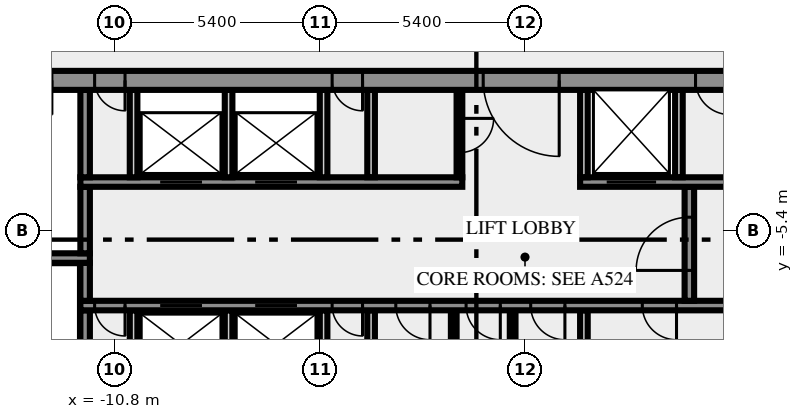
"""IFC4 building model, lengths in metres.
Left out: names, types, materials, properties, quantities, classifications, styles, units other than length and angle.
Written with IfcOpenShell. Run it as: python <this file> out.ifc"""

import sys

from ifc_helpers import new_model, si_unit, direction, frame, frame_2d, origin, place, context, subcontext, project, spatial, rectangle, extrude, element, fill, save


model = new_model("IFC4")
c1 = context("Model", 3, precision=1e-05, world=origin(), true_north=direction((0.0, 1.0)))
c2 = subcontext(c1, "Body", "Model", "MODEL_VIEW")
j1 = project(units=[si_unit("LENGTHUNIT", "METRE"), si_unit("PLANEANGLEUNIT", "RADIAN")], contexts=[c1])
p1 = place(None, origin())
s1 = spatial("IfcSite", under=j1, at=p1, CompositionType="ELEMENT")
p2 = place(p1, origin())
s2 = spatial("IfcBuilding", under=s1, at=p2, CompositionType="ELEMENT")
p3 = place(p2, frame((0.0, 0.0, 335.0)))
s3 = spatial("IfcBuildingStorey", under=s2, at=p3, CompositionType="ELEMENT", Elevation=335.0)
p4 = place(p3, frame((-11.575, -10.5, 0.0), z_axis=(0.0, 0.0, 1.0), x_axis=(0.0, 1.0, 0.0)))
e1 = element("IfcWall", 1, at=p4, inside=s3, PredefinedType="SHEAR", context=c2, shape_type="SweptSolid", body=[
    extrude(rectangle(XDim=3.0, YDim=0.25, at=frame_2d((1.5, 0.0))), origin(), (0.0, 0.0, 1.0), 3.65),
])
for number, where, z_axis, x_axis in (
    (2, (-10.3, -10.5, 0.0), (0.0, 0.0, 1.0), (0.0, 1.0, 0.0)),
    (3, (-7.8, -10.5, 0.0), (0.0, 0.0, 1.0), (0.0, 1.0, 0.0)),
    (4, (-5.3, -10.5, 0.0), (0.0, 0.0, 1.0), (0.0, 1.0, 0.0)),
    (5, (-4.05, -10.5, 0.0), (0.0, 0.0, 1.0), (0.0, 1.0, 0.0)),
):
    element("IfcWall", number, at=place(p3, frame(where, z_axis=z_axis, x_axis=x_axis)), inside=s3, PredefinedType="SOLIDWALL", context=c2, shape_type="SweptSolid", body=[
        extrude(rectangle(XDim=3.0, YDim=0.2, at=frame_2d((1.5, 0.0))), origin(), (0.0, 0.0, 1.0), 3.65),
    ])
for number, where, z_axis, x_axis in (
    (6, (-1.875, -10.5, 0.0), (0.0, 0.0, 1.0), (0.0, 1.0, 0.0)),
    (7, (-0.325, -10.5, 0.0), (0.0, 0.0, 1.0), (0.0, 1.0, 0.0)),
):
    element("IfcWall", number, at=place(p3, frame(where, z_axis=z_axis, x_axis=x_axis)), inside=s3, PredefinedType="PARTITIONING", context=c2, shape_type="SweptSolid", body=[
        extrude(rectangle(XDim=3.0, YDim=0.15, at=frame_2d((1.5, 0.0))), origin(), (0.0, 0.0, 1.0), 3.65),
    ])
p5 = place(p3, frame((1.55, -10.5, 0.0), z_axis=(0.0, 0.0, 1.0), x_axis=(0.0, 1.0, 0.0)))
e8 = element("IfcWall", 8, at=p5, inside=s3, PredefinedType="SOLIDWALL", context=c2, shape_type="SweptSolid", body=[
    extrude(rectangle(XDim=3.0, YDim=0.2, at=frame_2d((1.5, 0.0))), origin(), (0.0, 0.0, 1.0), 3.65),
])
p6 = place(p3, frame((11.7, -7.375, 0.0), z_axis=(0.0, 0.0, 1.0), x_axis=(-1.0, 0.0, 0.0)))
e9 = element("IfcWall", 9, at=p6, inside=s3, PredefinedType="SHEAR", context=c2, shape_type="SweptSolid", body=[
    extrude(rectangle(XDim=23.4, YDim=0.25, at=frame_2d((11.7, 0.0))), origin(), (0.0, 0.0, 1.0), 3.65),
])
p7 = place(p6, frame((22.225, 0.0, 0.0)))
e10 = element("IfcOpeningElement", 10, at=p7, cuts=e9, PredefinedType="OPENING", context=c2, shape_type="SweptSolid", body=[
    extrude(rectangle(XDim=0.8, YDim=2.1, at=frame_2d((0.4, 1.05))), frame((0.0, 0.135, 0.0), z_axis=(0.0, -1.0, 0.0), x_axis=(1.0, 0.0, 0.0)), (0.0, 0.0, 1.0), 0.27),
])
p8 = place(p6, frame((20.2, 0.0, 0.0)))
e11 = element("IfcOpeningElement", 11, at=p8, cuts=e9, PredefinedType="OPENING", context=c2, shape_type="SweptSolid", body=[
    extrude(rectangle(XDim=1.1, YDim=2.1, at=frame_2d((0.55, 1.05))), frame((0.0, 0.135, 0.0), z_axis=(0.0, -1.0, 0.0), x_axis=(1.0, 0.0, 0.0)), (0.0, 0.0, 1.0), 0.27),
])
p9 = place(p6, frame((17.7, 0.0, 0.0)))
e12 = element("IfcOpeningElement", 12, at=p9, cuts=e9, PredefinedType="OPENING", context=c2, shape_type="SweptSolid", body=[
    extrude(rectangle(XDim=1.1, YDim=2.1, at=frame_2d((0.55, 1.05))), frame((0.0, 0.135, 0.0), z_axis=(0.0, -1.0, 0.0), x_axis=(1.0, 0.0, 0.0)), (0.0, 0.0, 1.0), 0.27),
])
p10 = place(p6, frame((15.975, 0.0, 0.0)))
e13 = element("IfcOpeningElement", 13, at=p10, cuts=e9, PredefinedType="OPENING", context=c2, shape_type="SweptSolid", body=[
    extrude(rectangle(XDim=0.8, YDim=2.1, at=frame_2d((0.4, 1.05))), frame((0.0, 0.135, 0.0), z_axis=(0.0, -1.0, 0.0), x_axis=(1.0, 0.0, 0.0)), (0.0, 0.0, 1.0), 0.27),
])
p11 = place(p6, frame((14.2, 0.0, 0.0)))
e14 = element("IfcOpeningElement", 14, at=p11, cuts=e9, PredefinedType="OPENING", context=c2, shape_type="SweptSolid", body=[
    extrude(rectangle(XDim=0.9, YDim=2.1, at=frame_2d((0.45, 1.05))), frame((0.0, 0.135, 0.0), z_axis=(0.0, -1.0, 0.0), x_axis=(1.0, 0.0, 0.0)), (0.0, 0.0, 1.0), 0.27),
])
p12 = place(p6, frame((12.35, 0.0, 0.0)))
e15 = element("IfcOpeningElement", 15, at=p12, cuts=e9, PredefinedType="OPENING", context=c2, shape_type="SweptSolid", body=[
    extrude(rectangle(XDim=0.9, YDim=2.1, at=frame_2d((0.45, 1.05))), frame((0.0, 0.135, 0.0), z_axis=(0.0, -1.0, 0.0), x_axis=(1.0, 0.0, 0.0)), (0.0, 0.0, 1.0), 0.27),
])
p13 = place(p6, frame((10.65, 0.0, 0.0)))
e16 = element("IfcOpeningElement", 16, at=p13, cuts=e9, PredefinedType="OPENING", context=c2, shape_type="SweptSolid", body=[
    extrude(rectangle(XDim=0.9, YDim=2.1, at=frame_2d((0.45, 1.05))), frame((0.0, 0.135, 0.0), z_axis=(0.0, -1.0, 0.0), x_axis=(1.0, 0.0, 0.0)), (0.0, 0.0, 1.0), 0.27),
])
p14 = place(p6, frame((7.713, 0.0, 0.0)))
e17 = element("IfcOpeningElement", 17, at=p14, cuts=e9, PredefinedType="OPENING", context=c2, shape_type="SweptSolid", body=[
    extrude(rectangle(XDim=0.9, YDim=2.1, at=frame_2d((0.45, 1.05))), frame((0.0, 0.135, 0.0), z_axis=(0.0, -1.0, 0.0), x_axis=(1.0, 0.0, 0.0)), (0.0, 0.0, 1.0), 0.27),
])
p15 = place(p6, frame((4.15, 0.0, 0.0)))
e18 = element("IfcOpeningElement", 18, at=p15, cuts=e9, PredefinedType="OPENING", context=c2, shape_type="SweptSolid", body=[
    extrude(rectangle(XDim=0.9, YDim=2.1, at=frame_2d((0.45, 1.05))), frame((0.0, 0.135, 0.0), z_axis=(0.0, -1.0, 0.0), x_axis=(1.0, 0.0, 0.0)), (0.0, 0.0, 1.0), 0.27),
])
p16 = place(p6, frame((1.138, 0.0, 0.0)))
e19 = element("IfcOpeningElement", 19, at=p16, cuts=e9, PredefinedType="OPENING", context=c2, shape_type="SweptSolid", body=[
    extrude(rectangle(XDim=0.9, YDim=2.1, at=frame_2d((0.45, 1.05))), frame((0.0, 0.135, 0.0), z_axis=(0.0, -1.0, 0.0), x_axis=(1.0, 0.0, 0.0)), (0.0, 0.0, 1.0), 0.27),
])
p17 = place(p3, frame((-11.575, -7.25, 0.0), z_axis=(0.0, 0.0, 1.0), x_axis=(0.0, 1.0, 0.0)))
e20 = element("IfcWall", 20, at=p17, inside=s3, PredefinedType="SHEAR", context=c2, shape_type="SweptSolid", body=[
    extrude(rectangle(XDim=1.0, YDim=0.25, at=frame_2d((0.5, 0.0))), origin(), (0.0, 0.0, 1.0), 3.65),
])
p18 = place(p3, frame((4.325, -7.25, 0.0), z_axis=(0.0, 0.0, 1.0), x_axis=(0.0, 1.0, 0.0)))
e21 = element("IfcWall", 21, at=p18, inside=s3, PredefinedType="SHEAR", context=c2, shape_type="SweptSolid", body=[
    extrude(rectangle(XDim=3.0, YDim=0.25, at=frame_2d((1.5, 0.0))), origin(), (0.0, 0.0, 1.0), 3.65),
])
p19 = place(p18, frame((0.8, 0.0, 0.0)))
e22 = element("IfcOpeningElement", 22, at=p19, cuts=e21, PredefinedType="OPENING", context=c2, shape_type="SweptSolid", body=[
    extrude(rectangle(XDim=1.4, YDim=2.1, at=frame_2d((0.7, 1.05))), frame((0.0, 0.135, 0.0), z_axis=(0.0, -1.0, 0.0), x_axis=(1.0, 0.0, 0.0)), (0.0, 0.0, 1.0), 0.27),
])
p20 = place(p3, frame((-11.45, -6.125, 0.0), z_axis=(0.0, 0.0, 1.0), x_axis=(-1.0, 0.0, 0.0)))
e23 = element("IfcWall", 23, at=p20, inside=s3, PredefinedType="SHEAR", context=c2, shape_type="SweptSolid", body=[
    extrude(rectangle(XDim=8.05, YDim=0.25, at=frame_2d((4.025, 0.0))), origin(), (0.0, 0.0, 1.0), 3.65),
])
p21 = place(p20, frame((6.2, 0.0, 0.0)))
e24 = element("IfcOpeningElement", 24, at=p21, cuts=e23, PredefinedType="OPENING", context=c2, shape_type="SweptSolid", body=[
    extrude(rectangle(XDim=1.8, YDim=2.1, at=frame_2d((0.9, 1.05))), frame((0.0, 0.135, 0.0), z_axis=(0.0, -1.0, 0.0), x_axis=(1.0, 0.0, 0.0)), (0.0, 0.0, 1.0), 0.27),
])
p22 = place(p3, frame((-11.575, -6.0, 0.0), z_axis=(0.0, 0.0, 1.0), x_axis=(0.0, 1.0, 0.0)))
e25 = element("IfcWall", 25, at=p22, inside=s3, PredefinedType="SHEAR", context=c2, shape_type="SweptSolid", body=[
    extrude(rectangle(XDim=1.75, YDim=0.25, at=frame_2d((0.875, 0.0))), origin(), (0.0, 0.0, 1.0), 3.65),
])
p23 = place(p3, frame((-11.7, -4.125, 0.0), z_axis=(0.0, 0.0, 1.0), x_axis=(1.0, 0.0, 0.0)))
e26 = element("IfcWall", 26, at=p23, inside=s3, PredefinedType="SHEAR", context=c2, shape_type="SweptSolid", body=[
    extrude(rectangle(XDim=10.05, YDim=0.25, at=frame_2d((5.025, 0.0))), origin(), (0.0, 0.0, 1.0), 3.65),
])
p24 = place(p23, frame((2.1, 0.0, 0.0)))
e27 = element("IfcOpeningElement", 27, at=p24, cuts=e26, PredefinedType="OPENING", context=c2, shape_type="SweptSolid", body=[
    extrude(rectangle(XDim=1.1, YDim=2.1, at=frame_2d((0.55, 1.05))), frame((0.0, 0.135, 0.0), z_axis=(0.0, -1.0, 0.0), x_axis=(1.0, 0.0, 0.0)), (0.0, 0.0, 1.0), 0.27),
])
p25 = place(p23, frame((4.6, 0.0, 0.0)))
e28 = element("IfcOpeningElement", 28, at=p25, cuts=e26, PredefinedType="OPENING", context=c2, shape_type="SweptSolid", body=[
    extrude(rectangle(XDim=1.1, YDim=2.1, at=frame_2d((0.55, 1.05))), frame((0.0, 0.135, 0.0), z_axis=(0.0, -1.0, 0.0), x_axis=(1.0, 0.0, 0.0)), (0.0, 0.0, 1.0), 0.27),
])
p26 = place(p3, frame((1.45, -4.125, 0.0), z_axis=(0.0, 0.0, 1.0), x_axis=(1.0, 0.0, 0.0)))
e29 = element("IfcWall", 29, at=p26, inside=s3, PredefinedType="SHEAR", context=c2, shape_type="SweptSolid", body=[
    extrude(rectangle(XDim=10.25, YDim=0.25, at=frame_2d((5.125, 0.0))), origin(), (0.0, 0.0, 1.0), 3.65),
])
p27 = place(p26, frame((0.7, 0.0, 0.0)))
e30 = element("IfcOpeningElement", 30, at=p27, cuts=e29, PredefinedType="OPENING", context=c2, shape_type="SweptSolid", body=[
    extrude(rectangle(XDim=1.3, YDim=2.1, at=frame_2d((0.65, 1.05))), frame((0.0, 0.135, 0.0), z_axis=(0.0, -1.0, 0.0), x_axis=(1.0, 0.0, 0.0)), (0.0, 0.0, 1.0), 0.27),
])
p28 = place(p3, frame((-11.575, -4.0, 0.0), z_axis=(0.0, 0.0, 1.0), x_axis=(0.0, 1.0, 0.0)))
e31 = element("IfcWall", 31, at=p28, inside=s3, PredefinedType="SHEAR", context=c2, shape_type="SweptSolid", body=[
    extrude(rectangle(XDim=2.3, YDim=0.25, at=frame_2d((1.15, 0.0))), origin(), (0.0, 0.0, 1.0), 3.65),
])
for number, where, z_axis, x_axis in (
    (32, (-10.3, -4.0, 0.0), (0.0, 0.0, 1.0), (0.0, 1.0, 0.0)),
    (33, (-7.8, -4.0, 0.0), (0.0, 0.0, 1.0), (0.0, 1.0, 0.0)),
    (34, (-5.3, -4.0, 0.0), (0.0, 0.0, 1.0), (0.0, 1.0, 0.0)),
    (35, (-4.05, -4.0, 0.0), (0.0, 0.0, 1.0), (0.0, 1.0, 0.0)),
):
    element("IfcWall", number, at=place(p3, frame(where, z_axis=z_axis, x_axis=x_axis)), inside=s3, PredefinedType="SOLIDWALL", context=c2, shape_type="SweptSolid", body=[
        extrude(rectangle(XDim=2.3, YDim=0.2, at=frame_2d((1.15, 0.0))), origin(), (0.0, 0.0, 1.0), 3.65),
    ])
p29 = place(p3, frame((-1.725, -1.7, 0.0), z_axis=(0.0, 0.0, 1.0), x_axis=(0.0, -1.0, 0.0)))
e36 = element("IfcWall", 36, at=p29, inside=s3, PredefinedType="PARTITIONING", context=c2, shape_type="SweptSolid", body=[
    extrude(rectangle(XDim=2.3, YDim=0.15, at=frame_2d((1.15, 0.0))), origin(), (0.0, 0.0, 1.0), 3.65),
])
p30 = place(p29, frame((0.75, 0.0, 0.0)))
e37 = element("IfcOpeningElement", 37, at=p30, cuts=e36, PredefinedType="OPENING", context=c2, shape_type="SweptSolid", body=[
    extrude(rectangle(XDim=0.9, YDim=2.1, at=frame_2d((0.45, 1.05))), frame((0.0, 0.085, 0.0), z_axis=(0.0, -1.0, 0.0), x_axis=(1.0, 0.0, 0.0)), (0.0, 0.0, 1.0), 0.17),
])
for number, where, z_axis, x_axis in (
    (38, (1.55, -4.0, 0.0), (0.0, 0.0, 1.0), (0.0, 1.0, 0.0)),
    (39, (4.05, -4.0, 0.0), (0.0, 0.0, 1.0), (0.0, 1.0, 0.0)),
):
    element("IfcWall", number, at=place(p3, frame(where, z_axis=z_axis, x_axis=x_axis)), inside=s3, PredefinedType="SOLIDWALL", context=c2, shape_type="SweptSolid", body=[
        extrude(rectangle(XDim=2.3, YDim=0.2, at=frame_2d((1.15, 0.0))), origin(), (0.0, 0.0, 1.0), 3.65),
    ])
p31 = place(p3, frame((20.49, -1.45, 0.0), z_axis=(0.0, 0.0, 1.0), x_axis=(-1.0, 0.0, 0.0)))
e40 = element("IfcWall", 40, at=p31, inside=s3, PredefinedType="SHEAR", context=c2, shape_type="SweptSolid", body=[
    extrude(rectangle(XDim=40.98, YDim=0.5, at=frame_2d((20.49, 0.0))), origin(), (0.0, 0.0, 1.0), 3.65),
])
p32 = place(p31, frame((38.14, 0.0, 0.0)))
e41 = element("IfcOpeningElement", 41, at=p32, cuts=e40, PredefinedType="OPENING", context=c2, shape_type="SweptSolid", body=[
    extrude(rectangle(XDim=1.8, YDim=2.1, at=frame_2d((0.9, 1.05))), frame((0.0, 0.26, 0.0), z_axis=(0.0, -1.0, 0.0), x_axis=(1.0, 0.0, 0.0)), (0.0, 0.0, 1.0), 0.52),
])
p33 = place(p31, frame((36.728, 0.0, 0.0)))
e42 = element("IfcOpeningElement", 42, at=p33, cuts=e40, PredefinedType="OPENING", context=c2, shape_type="SweptSolid", body=[
    extrude(rectangle(XDim=0.8, YDim=2.1, at=frame_2d((0.4, 1.05))), frame((0.0, 0.26, 0.0), z_axis=(0.0, -1.0, 0.0), x_axis=(1.0, 0.0, 0.0)), (0.0, 0.0, 1.0), 0.52),
])
p34 = place(p31, frame((35.153, 0.0, 0.0)))
e43 = element("IfcOpeningElement", 43, at=p34, cuts=e40, PredefinedType="OPENING", context=c2, shape_type="SweptSolid", body=[
    extrude(rectangle(XDim=0.8, YDim=2.1, at=frame_2d((0.4, 1.05))), frame((0.0, 0.26, 0.0), z_axis=(0.0, -1.0, 0.0), x_axis=(1.0, 0.0, 0.0)), (0.0, 0.0, 1.0), 0.52),
])
p35 = place(p31, frame((32.94, 0.0, 0.0)))
e44 = element("IfcOpeningElement", 44, at=p35, cuts=e40, PredefinedType="OPENING", context=c2, shape_type="SweptSolid", body=[
    extrude(rectangle(XDim=0.9, YDim=2.1, at=frame_2d((0.45, 1.05))), frame((0.0, 0.26, 0.0), z_axis=(0.0, -1.0, 0.0), x_axis=(1.0, 0.0, 0.0)), (0.0, 0.0, 1.0), 0.52),
])
p36 = place(p31, frame((31.015, 0.0, 0.0)))
e45 = element("IfcOpeningElement", 45, at=p36, cuts=e40, PredefinedType="OPENING", context=c2, shape_type="SweptSolid", body=[
    extrude(rectangle(XDim=0.8, YDim=2.1, at=frame_2d((0.4, 1.05))), frame((0.0, 0.26, 0.0), z_axis=(0.0, -1.0, 0.0), x_axis=(1.0, 0.0, 0.0)), (0.0, 0.0, 1.0), 0.52),
])
p37 = place(p31, frame((24.765, 0.0, 0.0)))
e46 = element("IfcOpeningElement", 46, at=p37, cuts=e40, PredefinedType="OPENING", context=c2, shape_type="SweptSolid", body=[
    extrude(rectangle(XDim=0.8, YDim=2.1, at=frame_2d((0.4, 1.05))), frame((0.0, 0.26, 0.0), z_axis=(0.0, -1.0, 0.0), x_axis=(1.0, 0.0, 0.0)), (0.0, 0.0, 1.0), 0.52),
])
p38 = place(p31, frame((19.59, 0.0, 0.0)))
e47 = element("IfcOpeningElement", 47, at=p38, cuts=e40, PredefinedType="OPENING", context=c2, shape_type="SweptSolid", body=[
    extrude(rectangle(XDim=2.0, YDim=2.1, at=frame_2d((1.0, 1.05))), frame((0.0, 0.26, 0.0), z_axis=(0.0, -1.0, 0.0), x_axis=(1.0, 0.0, 0.0)), (0.0, 0.0, 1.0), 0.52),
])
p39 = place(p31, frame((15.103, 0.0, 0.0)))
e48 = element("IfcOpeningElement", 48, at=p39, cuts=e40, PredefinedType="OPENING", context=c2, shape_type="SweptSolid", body=[
    extrude(rectangle(XDim=0.9, YDim=2.1, at=frame_2d((0.45, 1.05))), frame((0.0, 0.26, 0.0), z_axis=(0.0, -1.0, 0.0), x_axis=(1.0, 0.0, 0.0)), (0.0, 0.0, 1.0), 0.52),
])
p40 = place(p31, frame((13.04, 0.0, 0.0)))
e49 = element("IfcOpeningElement", 49, at=p40, cuts=e40, PredefinedType="OPENING", context=c2, shape_type="SweptSolid", body=[
    extrude(rectangle(XDim=0.9, YDim=2.1, at=frame_2d((0.45, 1.05))), frame((0.0, 0.26, 0.0), z_axis=(0.0, -1.0, 0.0), x_axis=(1.0, 0.0, 0.0)), (0.0, 0.0, 1.0), 0.52),
])
p41 = place(p31, frame((10.177, 0.0, 0.0)))
e50 = element("IfcOpeningElement", 50, at=p41, cuts=e40, PredefinedType="OPENING", context=c2, shape_type="SweptSolid", body=[
    extrude(rectangle(XDim=0.9, YDim=2.1, at=frame_2d((0.45, 1.05))), frame((0.0, 0.26, 0.0), z_axis=(0.0, -1.0, 0.0), x_axis=(1.0, 0.0, 0.0)), (0.0, 0.0, 1.0), 0.52),
])
p42 = place(p31, frame((7.14, 0.0, 0.0)))
e51 = element("IfcOpeningElement", 51, at=p42, cuts=e40, PredefinedType="OPENING", context=c2, shape_type="SweptSolid", body=[
    extrude(rectangle(XDim=0.9, YDim=2.1, at=frame_2d((0.45, 1.05))), frame((0.0, 0.26, 0.0), z_axis=(0.0, -1.0, 0.0), x_axis=(1.0, 0.0, 0.0)), (0.0, 0.0, 1.0), 0.52),
])
p43 = place(p31, frame((4.19, 0.0, 0.0)))
e52 = element("IfcOpeningElement", 52, at=p43, cuts=e40, PredefinedType="OPENING", context=c2, shape_type="SweptSolid", body=[
    extrude(rectangle(XDim=0.9, YDim=2.1, at=frame_2d((0.45, 1.05))), frame((0.0, 0.26, 0.0), z_axis=(0.0, -1.0, 0.0), x_axis=(1.0, 0.0, 0.0)), (0.0, 0.0, 1.0), 0.52),
])
p44 = place(p31, frame((1.04, 0.0, 0.0)))
e53 = element("IfcOpeningElement", 53, at=p44, cuts=e40, PredefinedType="OPENING", context=c2, shape_type="SweptSolid", body=[
    extrude(rectangle(XDim=1.8, YDim=2.1, at=frame_2d((0.9, 1.05))), frame((0.0, 0.26, 0.0), z_axis=(0.0, -1.0, 0.0), x_axis=(1.0, 0.0, 0.0)), (0.0, 0.0, 1.0), 0.52),
])
p45 = place(p7, origin())
e54 = element("IfcDoor", 54, at=p45, inside=s3, OperationType="SINGLE_SWING_RIGHT", PredefinedType="DOOR", context=c2, shape_type="SweptSolid", body=[
    extrude(rectangle(XDim=0.8, YDim=2.1, at=frame_2d((0.4, 1.05))), frame((0.0, 0.025, 0.0), z_axis=(0.0, -1.0, 0.0), x_axis=(1.0, 0.0, 0.0)), (0.0, 0.0, 1.0), 0.05),
])
fill(e10, e54)
p46 = place(p8, origin())
e55 = element("IfcDoor", 55, at=p46, inside=s3, OperationType="DOUBLE_DOOR_SLIDING", PredefinedType="DOOR", context=c2, shape_type="SweptSolid", body=[
    extrude(rectangle(XDim=1.1, YDim=2.1, at=frame_2d((0.55, 1.05))), frame((0.0, 0.025, 0.0), z_axis=(0.0, -1.0, 0.0), x_axis=(1.0, 0.0, 0.0)), (0.0, 0.0, 1.0), 0.05),
])
fill(e11, e55)
p47 = place(p9, origin())
e56 = element("IfcDoor", 56, at=p47, inside=s3, OperationType="DOUBLE_DOOR_SLIDING", PredefinedType="DOOR", context=c2, shape_type="SweptSolid", body=[
    extrude(rectangle(XDim=1.1, YDim=2.1, at=frame_2d((0.55, 1.05))), frame((0.0, 0.025, 0.0), z_axis=(0.0, -1.0, 0.0), x_axis=(1.0, 0.0, 0.0)), (0.0, 0.0, 1.0), 0.05),
])
fill(e12, e56)
p48 = place(p10, origin())
e57 = element("IfcDoor", 57, at=p48, inside=s3, OperationType="SINGLE_SWING_RIGHT", PredefinedType="DOOR", context=c2, shape_type="SweptSolid", body=[
    extrude(rectangle(XDim=0.8, YDim=2.1, at=frame_2d((0.4, 1.05))), frame((0.0, 0.025, 0.0), z_axis=(0.0, -1.0, 0.0), x_axis=(1.0, 0.0, 0.0)), (0.0, 0.0, 1.0), 0.05),
])
fill(e13, e57)
p49 = place(p11, origin())
e58 = element("IfcDoor", 58, at=p49, inside=s3, OperationType="SINGLE_SWING_RIGHT", PredefinedType="DOOR", context=c2, shape_type="SweptSolid", body=[
    extrude(rectangle(XDim=0.9, YDim=2.1, at=frame_2d((0.45, 1.05))), frame((0.0, 0.025, 0.0), z_axis=(0.0, -1.0, 0.0), x_axis=(1.0, 0.0, 0.0)), (0.0, 0.0, 1.0), 0.05),
])
fill(e14, e58)
p50 = place(p12, origin())
e59 = element("IfcDoor", 59, at=p50, inside=s3, OperationType="SINGLE_SWING_RIGHT", PredefinedType="DOOR", context=c2, shape_type="SweptSolid", body=[
    extrude(rectangle(XDim=0.9, YDim=2.1, at=frame_2d((0.45, 1.05))), frame((0.0, 0.025, 0.0), z_axis=(0.0, -1.0, 0.0), x_axis=(1.0, 0.0, 0.0)), (0.0, 0.0, 1.0), 0.05),
])
fill(e15, e59)
p51 = place(p13, origin())
e60 = element("IfcDoor", 60, at=p51, inside=s3, OperationType="SINGLE_SWING_LEFT", PredefinedType="DOOR", context=c2, shape_type="SweptSolid", body=[
    extrude(rectangle(XDim=0.9, YDim=2.1, at=frame_2d((0.45, 1.05))), frame((0.0, 0.025, 0.0), z_axis=(0.0, -1.0, 0.0), x_axis=(1.0, 0.0, 0.0)), (0.0, 0.0, 1.0), 0.05),
])
fill(e16, e60)
p52 = place(p14, origin())
e61 = element("IfcDoor", 61, at=p52, inside=s3, OperationType="SINGLE_SWING_LEFT", PredefinedType="DOOR", context=c2, shape_type="SweptSolid", body=[
    extrude(rectangle(XDim=0.9, YDim=2.1, at=frame_2d((0.45, 1.05))), frame((0.0, 0.025, 0.0), z_axis=(0.0, -1.0, 0.0), x_axis=(1.0, 0.0, 0.0)), (0.0, 0.0, 1.0), 0.05),
])
fill(e17, e61)
p53 = place(p19, origin())
e62 = element("IfcDoor", 62, at=p53, inside=s3, OperationType="DOUBLE_DOOR_SINGLE_SWING", PredefinedType="DOOR", context=c2, shape_type="SweptSolid", body=[
    extrude(rectangle(XDim=1.4, YDim=2.1, at=frame_2d((0.7, 1.05))), frame((0.0, 0.025, 0.0), z_axis=(0.0, -1.0, 0.0), x_axis=(1.0, 0.0, 0.0)), (0.0, 0.0, 1.0), 0.05),
])
fill(e22, e62)
p54 = place(p24, origin())
e63 = element("IfcDoor", 63, at=p54, inside=s3, OperationType="DOUBLE_DOOR_SLIDING", PredefinedType="DOOR", context=c2, shape_type="SweptSolid", body=[
    extrude(rectangle(XDim=1.1, YDim=2.1, at=frame_2d((0.55, 1.05))), frame((0.0, 0.025, 0.0), z_axis=(0.0, -1.0, 0.0), x_axis=(1.0, 0.0, 0.0)), (0.0, 0.0, 1.0), 0.05),
])
fill(e27, e63)
p55 = place(p25, origin())
e64 = element("IfcDoor", 64, at=p55, inside=s3, OperationType="DOUBLE_DOOR_SLIDING", PredefinedType="DOOR", context=c2, shape_type="SweptSolid", body=[
    extrude(rectangle(XDim=1.1, YDim=2.1, at=frame_2d((0.55, 1.05))), frame((0.0, 0.025, 0.0), z_axis=(0.0, -1.0, 0.0), x_axis=(1.0, 0.0, 0.0)), (0.0, 0.0, 1.0), 0.05),
])
fill(e28, e64)
p56 = place(p27, origin())
e65 = element("IfcDoor", 65, at=p56, inside=s3, OperationType="DOUBLE_DOOR_SLIDING", PredefinedType="DOOR", context=c2, shape_type="SweptSolid", body=[
    extrude(rectangle(XDim=1.3, YDim=2.1, at=frame_2d((0.65, 1.05))), frame((0.0, 0.025, 0.0), z_axis=(0.0, -1.0, 0.0), x_axis=(1.0, 0.0, 0.0)), (0.0, 0.0, 1.0), 0.05),
])
fill(e30, e65)
p57 = place(p30, origin())
e66 = element("IfcDoor", 66, at=p57, inside=s3, OperationType="SINGLE_SWING_RIGHT", PredefinedType="DOOR", context=c2, shape_type="SweptSolid", body=[
    extrude(rectangle(XDim=0.9, YDim=2.1, at=frame_2d((0.45, 1.05))), frame((0.0, 0.025, 0.0), z_axis=(0.0, -1.0, 0.0), x_axis=(1.0, 0.0, 0.0)), (0.0, 0.0, 1.0), 0.05),
])
fill(e37, e66)
p58 = place(p36, origin())
e67 = element("IfcDoor", 67, at=p58, inside=s3, OperationType="SINGLE_SWING_RIGHT", PredefinedType="DOOR", context=c2, shape_type="SweptSolid", body=[
    extrude(rectangle(XDim=0.8, YDim=2.1, at=frame_2d((0.4, 1.05))), frame((0.0, 0.025, 0.0), z_axis=(0.0, -1.0, 0.0), x_axis=(1.0, 0.0, 0.0)), (0.0, 0.0, 1.0), 0.05),
])
fill(e45, e67)
p59 = place(p37, origin())
e68 = element("IfcDoor", 68, at=p59, inside=s3, OperationType="SINGLE_SWING_RIGHT", PredefinedType="DOOR", context=c2, shape_type="SweptSolid", body=[
    extrude(rectangle(XDim=0.8, YDim=2.1, at=frame_2d((0.4, 1.05))), frame((0.0, 0.025, 0.0), z_axis=(0.0, -1.0, 0.0), x_axis=(1.0, 0.0, 0.0)), (0.0, 0.0, 1.0), 0.05),
])
fill(e46, e68)
p60 = place(p38, origin())
e69 = element("IfcDoor", 69, at=p60, inside=s3, OperationType="DOUBLE_DOOR_SINGLE_SWING", PredefinedType="DOOR", context=c2, shape_type="SweptSolid", body=[
    extrude(rectangle(XDim=2.0, YDim=2.1, at=frame_2d((1.0, 1.05))), frame((0.0, 0.025, 0.0), z_axis=(0.0, -1.0, 0.0), x_axis=(1.0, 0.0, 0.0)), (0.0, 0.0, 1.0), 0.05),
])
fill(e47, e69)
p61 = place(p39, origin())
e70 = element("IfcDoor", 70, at=p61, inside=s3, OperationType="SINGLE_SWING_LEFT", PredefinedType="DOOR", context=c2, shape_type="SweptSolid", body=[
    extrude(rectangle(XDim=0.9, YDim=2.1, at=frame_2d((0.45, 1.05))), frame((0.0, 0.025, 0.0), z_axis=(0.0, -1.0, 0.0), x_axis=(1.0, 0.0, 0.0)), (0.0, 0.0, 1.0), 0.05),
])
fill(e48, e70)
save(model, sys.argv[1])
